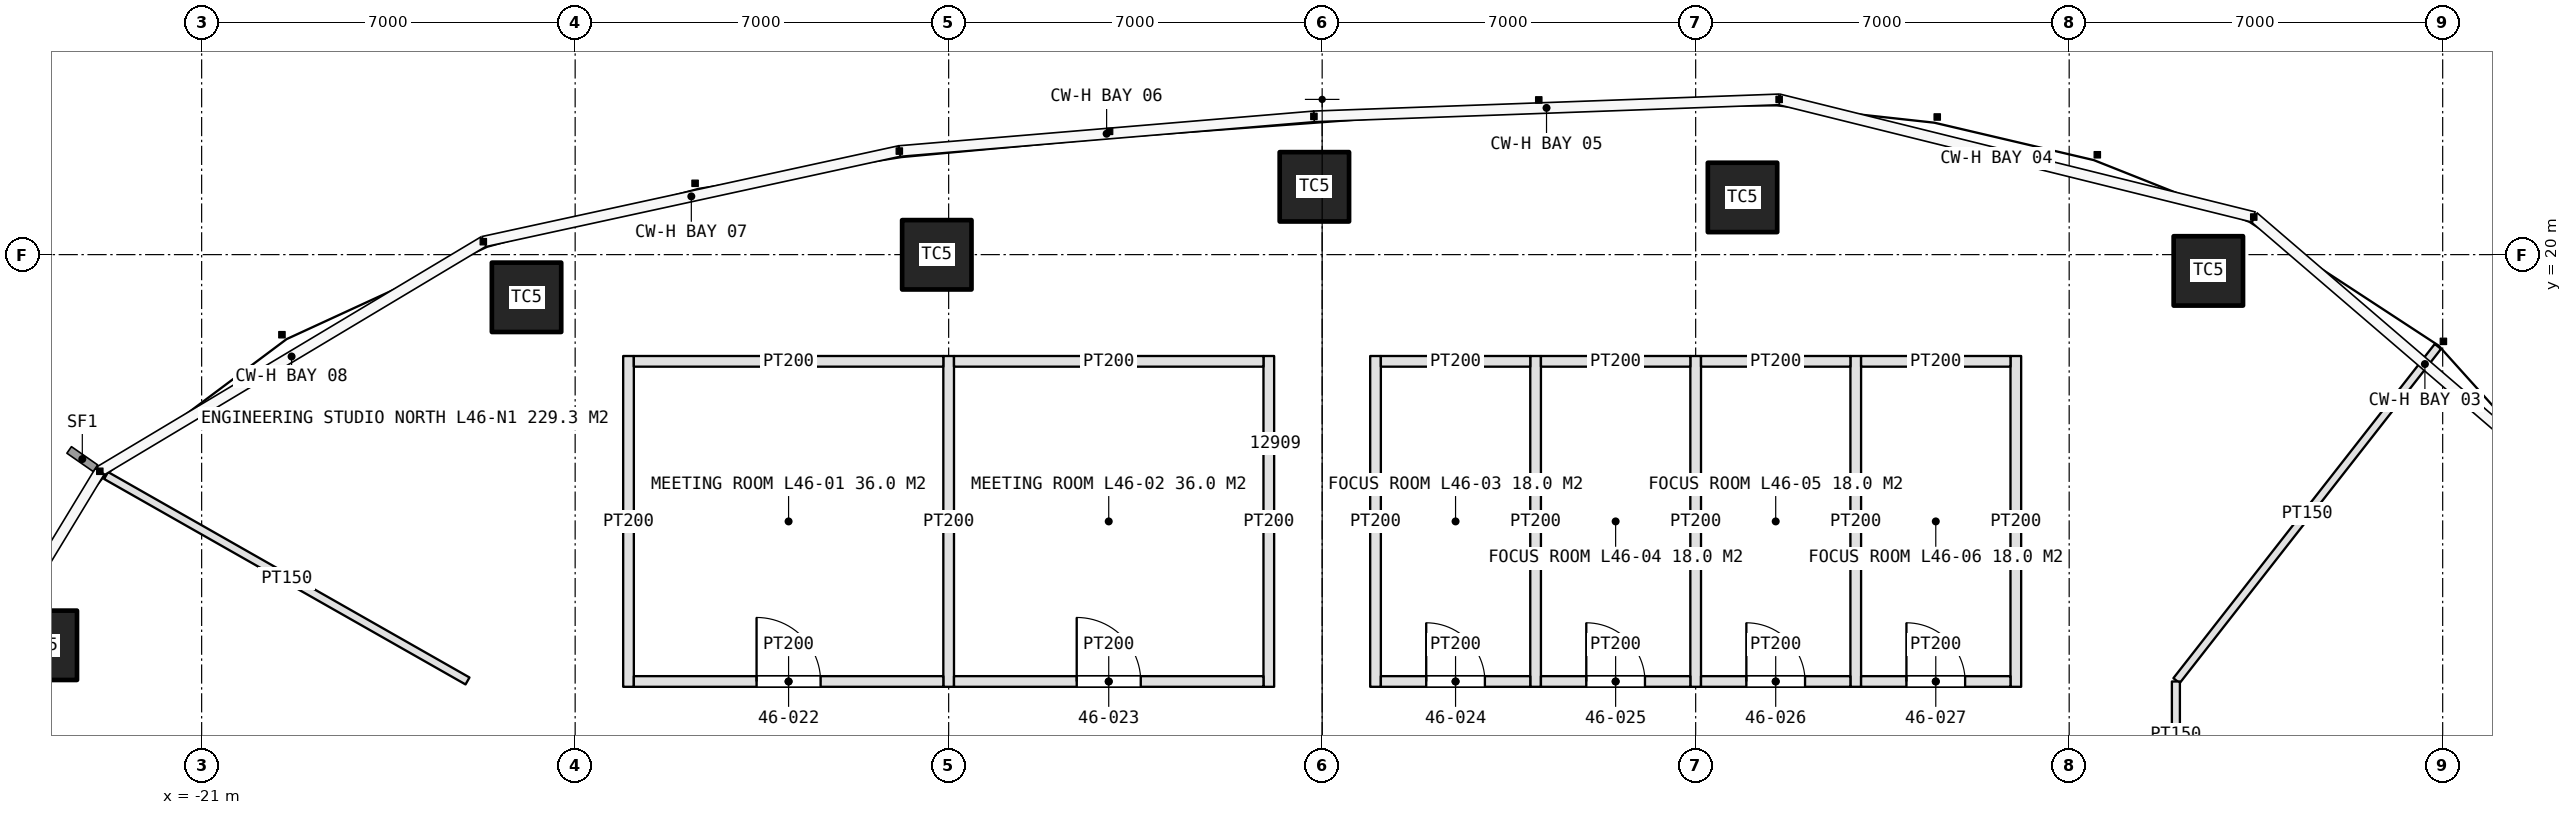
"""IFC4 building model, lengths in metres.
Left out: names, types, materials, properties, quantities, classifications, styles, units other than length and angle.
Written with IfcOpenShell. Run it as: python <this file> out.ifc"""

import sys

from ifc_helpers import new_model, si_unit, direction, frame, frame_2d, origin, origin_2d, place, context, subcontext, project, spatial, rectangle, extrude, element, fill, save


model = new_model("IFC4")
c1 = context("Model", 3, precision=1e-05, world=origin(), true_north=direction((0.0, 1.0)))
c2 = subcontext(c1, "Body", "Model", "MODEL_VIEW")
j1 = project(units=[si_unit("LENGTHUNIT", "METRE"), si_unit("PLANEANGLEUNIT", "RADIAN")], contexts=[c1])
p1 = place(None, origin())
s1 = spatial("IfcSite", under=j1, at=p1, CompositionType="ELEMENT")
p2 = place(p1, origin())
s2 = spatial("IfcBuilding", under=s1, at=p2, CompositionType="ELEMENT")
p3 = place(p2, frame((0.0, 0.0, 211.6)))
s3 = spatial("IfcBuildingStorey", under=s2, at=p3, CompositionType="ELEMENT", Elevation=211.6)
for number, where, z_axis, x_axis in (
    (1, (16.608, 19.695, 0.0), (0.0, 0.0, 1.0), (1.0, 0.0, 0.0)),
    (2, (7.878, 21.072, 0.0), (0.0, 0.0, 1.0), (1.0, 0.0, 0.0)),
    (3, (-0.146, 21.271, 0.0), (0.0, 0.0, 1.0), (1.0, 0.0, 0.0)),
    (4, (-7.222, 19.997, 0.0), (0.0, 0.0, 1.0), (1.0, 0.0, 0.0)),
    (5, (-14.911, 19.2, 0.0), (0.0, 0.0, 1.0), (1.0, 0.0, 0.0)),
    (6, (-23.986, 12.678, 0.0), (0.0, 0.0, 1.0), (1.0, 0.0, 0.0)),
):
    element("IfcColumn", number, at=place(p3, frame(where, z_axis=z_axis, x_axis=x_axis)), inside=s3, PredefinedType="COLUMN", context=c2, shape_type="SweptSolid", body=[
        extrude(rectangle(XDim=1.3, YDim=1.3, at=origin_2d()), origin(), (0.0, 0.0, 1.0), 4.2),
    ])
for number, where, z_axis, x_axis in (
    (7, (-13.0, 11.9, 0.0), (0.0, 0.0, 1.0), (0.0, 1.0, 0.0)),
    (8, (-7.0, 11.9, 0.0), (0.0, 0.0, 1.0), (0.0, 1.0, 0.0)),
    (9, (-1.0, 11.9, 0.0), (0.0, 0.0, 1.0), (0.0, 1.0, 0.0)),
):
    element("IfcWall", number, at=place(p3, frame(where, z_axis=z_axis, x_axis=x_axis)), inside=s3, PredefinedType="PARTITIONING", context=c2, shape_type="SweptSolid", body=[
        extrude(rectangle(XDim=6.2, YDim=0.2, at=frame_2d((3.1, 0.0))), origin(), (0.0, 0.0, 1.0), 3.0),
    ])
p4 = place(p3, frame((-12.9, 12.0, 0.0), z_axis=(0.0, 0.0, 1.0), x_axis=(1.0, 0.0, 0.0)))
e10 = element("IfcWall", 10, at=p4, inside=s3, PredefinedType="PARTITIONING", context=c2, shape_type="SweptSolid", body=[
    extrude(rectangle(XDim=5.8, YDim=0.2, at=frame_2d((2.9, 0.0))), origin(), (0.0, 0.0, 1.0), 3.0),
])
p5 = place(p4, frame((2.3, 0.0, 0.0)))
e11 = element("IfcOpeningElement", 11, at=p5, cuts=e10, PredefinedType="OPENING", context=c2, shape_type="SweptSolid", body=[
    extrude(rectangle(XDim=1.2, YDim=2.4, at=frame_2d((0.6, 1.2))), frame((0.0, 0.11, 0.0), z_axis=(0.0, -1.0, 0.0), x_axis=(1.0, 0.0, 0.0)), (0.0, 0.0, 1.0), 0.22),
])
p6 = place(p3, frame((-12.9, 18.0, 0.0), z_axis=(0.0, 0.0, 1.0), x_axis=(1.0, 0.0, 0.0)))
e12 = element("IfcWall", 12, at=p6, inside=s3, PredefinedType="PARTITIONING", context=c2, shape_type="SweptSolid", body=[
    extrude(rectangle(XDim=5.8, YDim=0.2, at=frame_2d((2.9, 0.0))), origin(), (0.0, 0.0, 1.0), 3.0),
])
p7 = place(p3, frame((-6.9, 12.0, 0.0), z_axis=(0.0, 0.0, 1.0), x_axis=(1.0, 0.0, 0.0)))
e13 = element("IfcWall", 13, at=p7, inside=s3, PredefinedType="PARTITIONING", context=c2, shape_type="SweptSolid", body=[
    extrude(rectangle(XDim=5.8, YDim=0.2, at=frame_2d((2.9, 0.0))), origin(), (0.0, 0.0, 1.0), 3.0),
])
p8 = place(p7, frame((2.3, 0.0, 0.0)))
e14 = element("IfcOpeningElement", 14, at=p8, cuts=e13, PredefinedType="OPENING", context=c2, shape_type="SweptSolid", body=[
    extrude(rectangle(XDim=1.2, YDim=2.4, at=frame_2d((0.6, 1.2))), frame((0.0, 0.11, 0.0), z_axis=(0.0, -1.0, 0.0), x_axis=(1.0, 0.0, 0.0)), (0.0, 0.0, 1.0), 0.22),
])
p9 = place(p3, frame((-6.9, 18.0, 0.0), z_axis=(0.0, 0.0, 1.0), x_axis=(1.0, 0.0, 0.0)))
e15 = element("IfcWall", 15, at=p9, inside=s3, PredefinedType="PARTITIONING", context=c2, shape_type="SweptSolid", body=[
    extrude(rectangle(XDim=5.8, YDim=0.2, at=frame_2d((2.9, 0.0))), origin(), (0.0, 0.0, 1.0), 3.0),
])
for number, where, z_axis, x_axis in (
    (16, (1.0, 11.9, 0.0), (0.0, 0.0, 1.0), (0.0, 1.0, 0.0)),
    (17, (4.0, 11.9, 0.0), (0.0, 0.0, 1.0), (0.0, 1.0, 0.0)),
    (18, (7.0, 11.9, 0.0), (0.0, 0.0, 1.0), (0.0, 1.0, 0.0)),
    (19, (10.0, 11.9, 0.0), (0.0, 0.0, 1.0), (0.0, 1.0, 0.0)),
    (20, (13.0, 11.9, 0.0), (0.0, 0.0, 1.0), (0.0, 1.0, 0.0)),
):
    element("IfcWall", number, at=place(p3, frame(where, z_axis=z_axis, x_axis=x_axis)), inside=s3, PredefinedType="PARTITIONING", context=c2, shape_type="SweptSolid", body=[
        extrude(rectangle(XDim=6.2, YDim=0.2, at=frame_2d((3.1, 0.0))), origin(), (0.0, 0.0, 1.0), 3.0),
    ])
p10 = place(p3, frame((1.1, 12.0, 0.0), z_axis=(0.0, 0.0, 1.0), x_axis=(1.0, 0.0, 0.0)))
e21 = element("IfcWall", 21, at=p10, inside=s3, PredefinedType="PARTITIONING", context=c2, shape_type="SweptSolid", body=[
    extrude(rectangle(XDim=2.8, YDim=0.2, at=frame_2d((1.4, 0.0))), origin(), (0.0, 0.0, 1.0), 3.0),
])
p11 = place(p10, frame((0.85, 0.0, 0.0)))
e22 = element("IfcOpeningElement", 22, at=p11, cuts=e21, PredefinedType="OPENING", context=c2, shape_type="SweptSolid", body=[
    extrude(rectangle(XDim=1.1, YDim=2.3, at=frame_2d((0.55, 1.15))), frame((0.0, 0.11, 0.0), z_axis=(0.0, -1.0, 0.0), x_axis=(1.0, 0.0, 0.0)), (0.0, 0.0, 1.0), 0.22),
])
p12 = place(p3, frame((1.1, 18.0, 0.0), z_axis=(0.0, 0.0, 1.0), x_axis=(1.0, 0.0, 0.0)))
e23 = element("IfcWall", 23, at=p12, inside=s3, PredefinedType="PARTITIONING", context=c2, shape_type="SweptSolid", body=[
    extrude(rectangle(XDim=2.8, YDim=0.2, at=frame_2d((1.4, 0.0))), origin(), (0.0, 0.0, 1.0), 3.0),
])
p13 = place(p3, frame((4.1, 12.0, 0.0), z_axis=(0.0, 0.0, 1.0), x_axis=(1.0, 0.0, 0.0)))
e24 = element("IfcWall", 24, at=p13, inside=s3, PredefinedType="PARTITIONING", context=c2, shape_type="SweptSolid", body=[
    extrude(rectangle(XDim=2.8, YDim=0.2, at=frame_2d((1.4, 0.0))), origin(), (0.0, 0.0, 1.0), 3.0),
])
p14 = place(p13, frame((0.85, 0.0, 0.0)))
e25 = element("IfcOpeningElement", 25, at=p14, cuts=e24, PredefinedType="OPENING", context=c2, shape_type="SweptSolid", body=[
    extrude(rectangle(XDim=1.1, YDim=2.3, at=frame_2d((0.55, 1.15))), frame((0.0, 0.11, 0.0), z_axis=(0.0, -1.0, 0.0), x_axis=(1.0, 0.0, 0.0)), (0.0, 0.0, 1.0), 0.22),
])
p15 = place(p3, frame((4.1, 18.0, 0.0), z_axis=(0.0, 0.0, 1.0), x_axis=(1.0, 0.0, 0.0)))
e26 = element("IfcWall", 26, at=p15, inside=s3, PredefinedType="PARTITIONING", context=c2, shape_type="SweptSolid", body=[
    extrude(rectangle(XDim=2.8, YDim=0.2, at=frame_2d((1.4, 0.0))), origin(), (0.0, 0.0, 1.0), 3.0),
])
p16 = place(p3, frame((7.1, 12.0, 0.0), z_axis=(0.0, 0.0, 1.0), x_axis=(1.0, 0.0, 0.0)))
e27 = element("IfcWall", 27, at=p16, inside=s3, PredefinedType="PARTITIONING", context=c2, shape_type="SweptSolid", body=[
    extrude(rectangle(XDim=2.8, YDim=0.2, at=frame_2d((1.4, 0.0))), origin(), (0.0, 0.0, 1.0), 3.0),
])
p17 = place(p16, frame((0.85, 0.0, 0.0)))
e28 = element("IfcOpeningElement", 28, at=p17, cuts=e27, PredefinedType="OPENING", context=c2, shape_type="SweptSolid", body=[
    extrude(rectangle(XDim=1.1, YDim=2.3, at=frame_2d((0.55, 1.15))), frame((0.0, 0.11, 0.0), z_axis=(0.0, -1.0, 0.0), x_axis=(1.0, 0.0, 0.0)), (0.0, 0.0, 1.0), 0.22),
])
p18 = place(p3, frame((7.1, 18.0, 0.0), z_axis=(0.0, 0.0, 1.0), x_axis=(1.0, 0.0, 0.0)))
e29 = element("IfcWall", 29, at=p18, inside=s3, PredefinedType="PARTITIONING", context=c2, shape_type="SweptSolid", body=[
    extrude(rectangle(XDim=2.8, YDim=0.2, at=frame_2d((1.4, 0.0))), origin(), (0.0, 0.0, 1.0), 3.0),
])
p19 = place(p3, frame((10.1, 12.0, 0.0), z_axis=(0.0, 0.0, 1.0), x_axis=(1.0, 0.0, 0.0)))
e30 = element("IfcWall", 30, at=p19, inside=s3, PredefinedType="PARTITIONING", context=c2, shape_type="SweptSolid", body=[
    extrude(rectangle(XDim=2.8, YDim=0.2, at=frame_2d((1.4, 0.0))), origin(), (0.0, 0.0, 1.0), 3.0),
])
p20 = place(p19, frame((0.85, 0.0, 0.0)))
e31 = element("IfcOpeningElement", 31, at=p20, cuts=e30, PredefinedType="OPENING", context=c2, shape_type="SweptSolid", body=[
    extrude(rectangle(XDim=1.1, YDim=2.3, at=frame_2d((0.55, 1.15))), frame((0.0, 0.11, 0.0), z_axis=(0.0, -1.0, 0.0), x_axis=(1.0, 0.0, 0.0)), (0.0, 0.0, 1.0), 0.22),
])
p21 = place(p3, frame((10.1, 18.0, 0.0), z_axis=(0.0, 0.0, 1.0), x_axis=(1.0, 0.0, 0.0)))
e32 = element("IfcWall", 32, at=p21, inside=s3, PredefinedType="PARTITIONING", context=c2, shape_type="SweptSolid", body=[
    extrude(rectangle(XDim=2.8, YDim=0.2, at=frame_2d((1.4, 0.0))), origin(), (0.0, 0.0, 1.0), 3.0),
])
p22 = place(p3, frame((-16.017, 12.01, 0.0), z_axis=(0.0, 0.0, 1.0), x_axis=(-0.869357432803, 0.494183826151, 0.0)))
e33 = element("IfcWall", 33, at=p22, inside=s3, PredefinedType="PARTITIONING", context=c2, shape_type="SweptSolid", body=[
    extrude(rectangle(XDim=7.791, YDim=0.15, at=frame_2d((3.896, 0.0))), origin(), (0.0, 0.0, 1.0), 3.0),
])
p23 = place(p3, frame((16.012, 12.016, 0.0), z_axis=(0.0, 0.0, 1.0), x_axis=(0.616030058222, 0.787722646219, 0.0)))
e34 = element("IfcWall", 34, at=p23, inside=s3, PredefinedType="PARTITIONING", context=c2, shape_type="SweptSolid", body=[
    extrude(rectangle(XDim=7.952, YDim=0.15, at=frame_2d((3.976, 0.0))), origin(), (0.0, 0.0, 1.0), 3.0),
])
p24 = place(p3, frame((16.0, 10.0, 0.0), z_axis=(0.0, 0.0, 1.0), x_axis=(0.0, 1.0, 0.0)))
e35 = element("IfcWall", 35, at=p24, inside=s3, PredefinedType="PARTITIONING", context=c2, shape_type="SweptSolid", body=[
    extrude(rectangle(XDim=2.0, YDim=0.15, at=frame_2d((1.0, 0.0))), origin(), (0.0, 0.0, 1.0), 3.0),
])
p25 = place(p5, origin())
e36 = element("IfcDoor", 36, at=p25, inside=s3, OperationType="SINGLE_SWING_LEFT", PredefinedType="DOOR", context=c2, shape_type="SweptSolid", body=[
    extrude(rectangle(XDim=1.2, YDim=2.4, at=frame_2d((0.6, 1.2))), frame((0.0, 0.025, 0.0), z_axis=(0.0, -1.0, 0.0), x_axis=(1.0, 0.0, 0.0)), (0.0, 0.0, 1.0), 0.05),
])
fill(e11, e36)
p26 = place(p8, origin())
e37 = element("IfcDoor", 37, at=p26, inside=s3, OperationType="SINGLE_SWING_LEFT", PredefinedType="DOOR", context=c2, shape_type="SweptSolid", body=[
    extrude(rectangle(XDim=1.2, YDim=2.4, at=frame_2d((0.6, 1.2))), frame((0.0, 0.025, 0.0), z_axis=(0.0, -1.0, 0.0), x_axis=(1.0, 0.0, 0.0)), (0.0, 0.0, 1.0), 0.05),
])
fill(e14, e37)
p27 = place(p11, origin())
e38 = element("IfcDoor", 38, at=p27, inside=s3, OperationType="SINGLE_SWING_LEFT", PredefinedType="DOOR", context=c2, shape_type="SweptSolid", body=[
    extrude(rectangle(XDim=1.1, YDim=2.3, at=frame_2d((0.55, 1.15))), frame((0.0, 0.025, 0.0), z_axis=(0.0, -1.0, 0.0), x_axis=(1.0, 0.0, 0.0)), (0.0, 0.0, 1.0), 0.05),
])
fill(e22, e38)
p28 = place(p14, origin())
e39 = element("IfcDoor", 39, at=p28, inside=s3, OperationType="SINGLE_SWING_LEFT", PredefinedType="DOOR", context=c2, shape_type="SweptSolid", body=[
    extrude(rectangle(XDim=1.1, YDim=2.3, at=frame_2d((0.55, 1.15))), frame((0.0, 0.025, 0.0), z_axis=(0.0, -1.0, 0.0), x_axis=(1.0, 0.0, 0.0)), (0.0, 0.0, 1.0), 0.05),
])
fill(e25, e39)
p29 = place(p17, origin())
e40 = element("IfcDoor", 40, at=p29, inside=s3, OperationType="SINGLE_SWING_LEFT", PredefinedType="DOOR", context=c2, shape_type="SweptSolid", body=[
    extrude(rectangle(XDim=1.1, YDim=2.3, at=frame_2d((0.55, 1.15))), frame((0.0, 0.025, 0.0), z_axis=(0.0, -1.0, 0.0), x_axis=(1.0, 0.0, 0.0)), (0.0, 0.0, 1.0), 0.05),
])
fill(e28, e40)
p30 = place(p20, origin())
e41 = element("IfcDoor", 41, at=p30, inside=s3, OperationType="SINGLE_SWING_LEFT", PredefinedType="DOOR", context=c2, shape_type="SweptSolid", body=[
    extrude(rectangle(XDim=1.1, YDim=2.3, at=frame_2d((0.55, 1.15))), frame((0.0, 0.025, 0.0), z_axis=(0.0, -1.0, 0.0), x_axis=(1.0, 0.0, 0.0)), (0.0, 0.0, 1.0), 0.05),
])
fill(e31, e41)
save(model, sys.argv[1])
